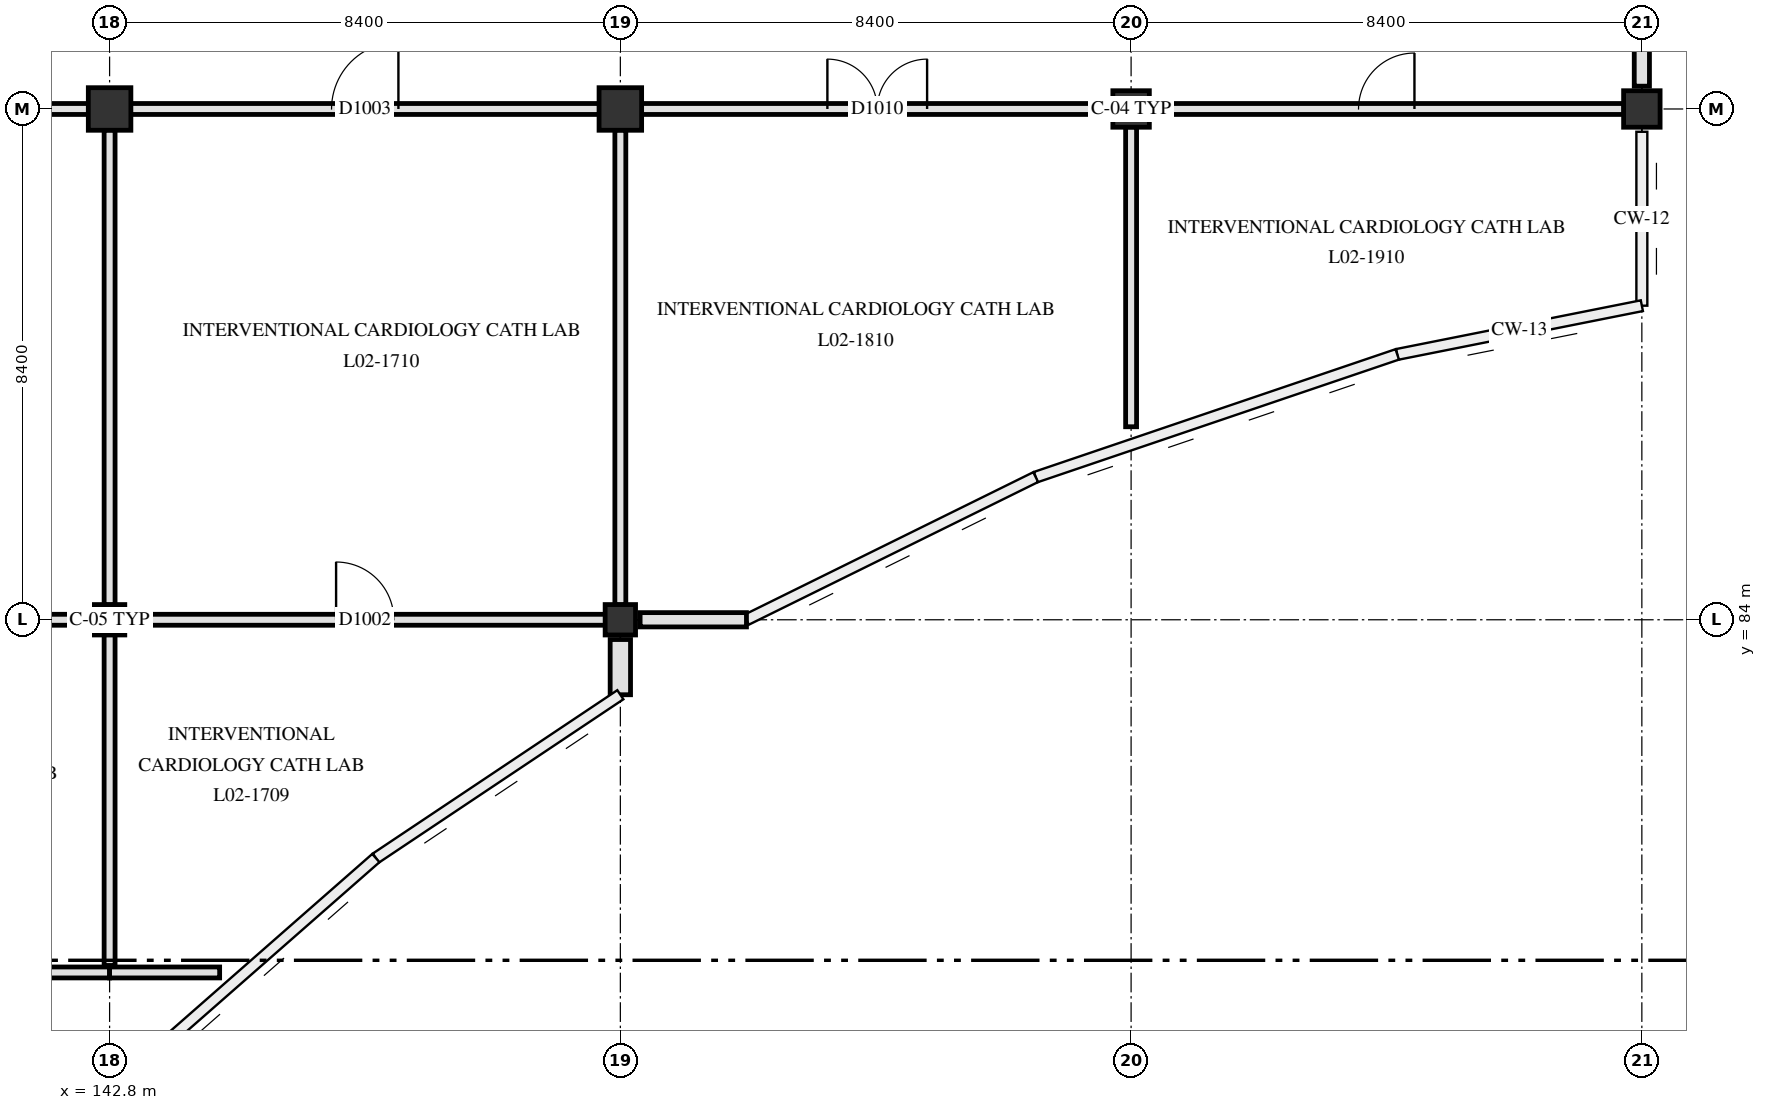
"""IFC4 building model, lengths in metres.
Left out: names, types, materials, properties, quantities, classifications, styles, units other than length and angle.
Written with IfcOpenShell. Run it as: python <this file> out.ifc"""

import sys

from ifc_helpers import new_model, si_unit, direction, frame, frame_2d, origin, origin_2d, place, context, subcontext, project, spatial, rectangle, extrude, element, fill, save


model = new_model("IFC4")
c1 = context("Model", 3, precision=1e-05, world=origin(), true_north=direction((0.0, 1.0)))
c2 = subcontext(c1, "Body", "Model", "MODEL_VIEW")
j1 = project(units=[si_unit("LENGTHUNIT", "METRE"), si_unit("PLANEANGLEUNIT", "RADIAN")], contexts=[c1])
p1 = place(None, origin())
s1 = spatial("IfcSite", under=j1, at=p1, CompositionType="ELEMENT")
p2 = place(p1, origin())
s2 = spatial("IfcBuilding", under=s1, at=p2, CompositionType="ELEMENT")
p3 = place(p2, frame((0.0, 0.0, 9.3)))
s3 = spatial("IfcBuildingStorey", under=s2, at=p3, CompositionType="ELEMENT", Elevation=9.3)
p4 = place(p3, frame((142.8, 84.0, 0.0), z_axis=(0.0, 0.0, 1.0), x_axis=(1.0, 0.0, 0.0)))
e1 = element("IfcColumn", 1, at=p4, inside=s3, PredefinedType="COLUMN", context=c2, shape_type="SweptSolid", body=[
    extrude(rectangle(XDim=0.5, YDim=0.5, at=origin_2d()), origin(), (0.0, 0.0, 1.0), 5.1),
])
p5 = place(p3, frame((142.8, 92.4, 0.0), z_axis=(0.0, 0.0, 1.0), x_axis=(1.0, 0.0, 0.0)))
e2 = element("IfcColumn", 2, at=p5, inside=s3, PredefinedType="COLUMN", context=c2, shape_type="SweptSolid", body=[
    extrude(rectangle(XDim=0.7, YDim=0.7, at=origin_2d()), origin(), (0.0, 0.0, 1.0), 5.1),
])
p6 = place(p3, frame((151.2, 84.0, 0.0), z_axis=(0.0, 0.0, 1.0), x_axis=(1.0, 0.0, 0.0)))
e3 = element("IfcColumn", 3, at=p6, inside=s3, PredefinedType="COLUMN", context=c2, shape_type="SweptSolid", body=[
    extrude(rectangle(XDim=0.5, YDim=0.5, at=origin_2d()), origin(), (0.0, 0.0, 1.0), 5.1),
])
p7 = place(p3, frame((151.2, 92.4, 0.0), z_axis=(0.0, 0.0, 1.0), x_axis=(1.0, 0.0, 0.0)))
e4 = element("IfcColumn", 4, at=p7, inside=s3, PredefinedType="COLUMN", context=c2, shape_type="SweptSolid", body=[
    extrude(rectangle(XDim=0.7, YDim=0.7, at=origin_2d()), origin(), (0.0, 0.0, 1.0), 5.1),
])
for number, where, z_axis, x_axis in (
    (5, (159.6, 92.4, 0.0), (0.0, 0.0, 1.0), (1.0, 0.0, 0.0)),
    (6, (168.0, 92.4, 0.0), (0.0, 0.0, 1.0), (1.0, 0.0, 0.0)),
):
    element("IfcColumn", number, at=place(p3, frame(where, z_axis=z_axis, x_axis=x_axis)), inside=s3, PredefinedType="COLUMN", context=c2, shape_type="SweptSolid", body=[
        extrude(rectangle(XDim=0.6, YDim=0.6, at=origin_2d()), origin(), (0.0, 0.0, 1.0), 5.1),
    ])
p8 = place(p3, frame((168.0, 100.425, 0.0), z_axis=(0.0, 0.0, 1.0), x_axis=(0.0, -1.0, 0.0)))
e7 = element("IfcWall", 7, at=p8, inside=s3, PredefinedType="SOLIDWALL", context=c2, shape_type="SweptSolid", body=[
    extrude(rectangle(XDim=7.65, YDim=0.25, at=frame_2d((3.825, 0.0))), origin(), (0.0, 0.0, 1.0), 4.07),
])
p9 = place(p8, frame((1.062, 0.0, 0.85)))
e8 = element("IfcOpeningElement", 8, at=p9, cuts=e7, PredefinedType="OPENING", context=c2, shape_type="SweptSolid", body=[
    extrude(rectangle(XDim=1.7, YDim=1.42, at=frame_2d((0.85, 0.71))), frame((0.0, 0.135, 0.0), z_axis=(0.0, -1.0, 0.0), x_axis=(1.0, 0.0, 0.0)), (0.0, 0.0, 1.0), 0.27),
])
p10 = place(p8, frame((4.837, 0.0, 0.85)))
e9 = element("IfcOpeningElement", 9, at=p10, cuts=e7, PredefinedType="OPENING", context=c2, shape_type="SweptSolid", body=[
    extrude(rectangle(XDim=1.8, YDim=1.42, at=frame_2d((0.9, 0.71))), frame((0.0, 0.135, 0.0), z_axis=(0.0, -1.0, 0.0), x_axis=(1.0, 0.0, 0.0)), (0.0, 0.0, 1.0), 0.27),
])
p11 = place(p3, frame((153.274, 84.0, 0.0), z_axis=(0.0, 0.0, 1.0), x_axis=(-1.0, 0.0, 0.0)))
e10 = element("IfcWall", 10, at=p11, inside=s3, PredefinedType="SOLIDWALL", context=c2, shape_type="SweptSolid", body=[
    extrude(rectangle(XDim=1.749, YDim=0.235, at=frame_2d((0.875, 0.0))), origin(), (0.0, 0.0, 1.0), 4.77),
])
p12 = place(p3, frame((151.2, 83.675, 0.0), z_axis=(0.0, 0.0, 1.0), x_axis=(0.0, -1.0, 0.0)))
e11 = element("IfcWall", 11, at=p12, inside=s3, PredefinedType="SOLIDWALL", context=c2, shape_type="SweptSolid", body=[
    extrude(rectangle(XDim=0.908, YDim=0.335, at=frame_2d((0.454, 0.0))), origin(), (0.0, 0.0, 1.0), 4.77),
])
p13 = place(p3, frame((137.0, 78.2, 0.0), z_axis=(0.0, 0.0, 1.0), x_axis=(1.0, 0.0, 0.0)))
e12 = element("IfcWall", 12, at=p13, inside=s3, PredefinedType="PARTITIONING", context=c2, shape_type="SweptSolid", body=[
    extrude(rectangle(XDim=5.8, YDim=0.18, at=frame_2d((2.9, 0.0))), origin(), (0.0, 0.0, 1.0), 4.77),
])
p14 = place(p13, frame((2.1, 0.0, 0.0)))
e13 = element("IfcOpeningElement", 13, at=p14, cuts=e12, PredefinedType="OPENING", context=c2, shape_type="SweptSolid", body=[
    extrude(rectangle(XDim=1.6, YDim=2.25, at=frame_2d((0.8, 1.125))), frame((0.0, 0.1, 0.0), z_axis=(0.0, -1.0, 0.0), x_axis=(1.0, 0.0, 0.0)), (0.0, 0.0, 1.0), 0.2),
])
p15 = place(p3, frame((142.8, 78.2, 0.0), z_axis=(0.0, 0.0, 1.0), x_axis=(1.0, 0.0, 0.0)))
e14 = element("IfcWall", 14, at=p15, inside=s3, PredefinedType="PARTITIONING", context=c2, shape_type="SweptSolid", body=[
    extrude(rectangle(XDim=1.81, YDim=0.18, at=frame_2d((0.905, 0.0))), origin(), (0.0, 0.0, 1.0), 4.77),
])
p16 = place(p3, frame((137.0, 84.0, 0.0), z_axis=(0.0, 0.0, 1.0), x_axis=(1.0, 0.0, 0.0)))
e15 = element("IfcWall", 15, at=p16, inside=s3, PredefinedType="PARTITIONING", context=c2, shape_type="SweptSolid", body=[
    extrude(rectangle(XDim=5.555, YDim=0.18, at=frame_2d((2.777, 0.0))), origin(), (0.0, 0.0, 1.0), 4.17),
])
p17 = place(p3, frame((143.045, 84.0, 0.0), z_axis=(0.0, 0.0, 1.0), x_axis=(1.0, 0.0, 0.0)))
e16 = element("IfcWall", 16, at=p17, inside=s3, PredefinedType="PARTITIONING", context=c2, shape_type="SweptSolid", body=[
    extrude(rectangle(XDim=7.91, YDim=0.18, at=frame_2d((3.955, 0.0))), origin(), (0.0, 0.0, 1.0), 4.17),
])
p18 = place(p17, frame((3.48, 0.0, 0.0)))
e17 = element("IfcOpeningElement", 17, at=p18, cuts=e16, PredefinedType="OPENING", context=c2, shape_type="SweptSolid", body=[
    extrude(rectangle(XDim=0.95, YDim=2.1, at=frame_2d((0.475, 1.05))), frame((0.0, 0.1, 0.0), z_axis=(0.0, -1.0, 0.0), x_axis=(1.0, 0.0, 0.0)), (0.0, 0.0, 1.0), 0.2),
])
p19 = place(p3, frame((137.0, 92.4, 0.0), z_axis=(0.0, 0.0, 1.0), x_axis=(1.0, 0.0, 0.0)))
e18 = element("IfcWall", 18, at=p19, inside=s3, PredefinedType="PARTITIONING", context=c2, shape_type="SweptSolid", body=[
    extrude(rectangle(XDim=5.455, YDim=0.18, at=frame_2d((2.728, 0.0))), origin(), (0.0, 0.0, 1.0), 4.17),
])
p20 = place(p19, frame((1.827, 0.0, 0.0)))
e19 = element("IfcOpeningElement", 19, at=p20, cuts=e18, PredefinedType="OPENING", context=c2, shape_type="SweptSolid", body=[
    extrude(rectangle(XDim=1.8, YDim=2.25, at=frame_2d((0.9, 1.125))), frame((0.0, 0.1, 0.0), z_axis=(0.0, -1.0, 0.0), x_axis=(1.0, 0.0, 0.0)), (0.0, 0.0, 1.0), 0.2),
])
p21 = place(p3, frame((143.145, 92.4, 0.0), z_axis=(0.0, 0.0, 1.0), x_axis=(1.0, 0.0, 0.0)))
e20 = element("IfcWall", 20, at=p21, inside=s3, PredefinedType="PARTITIONING", context=c2, shape_type="SweptSolid", body=[
    extrude(rectangle(XDim=7.71, YDim=0.18, at=frame_2d((3.855, 0.0))), origin(), (0.0, 0.0, 1.0), 4.17),
])
p22 = place(p21, frame((3.305, 0.0, 0.0)))
e21 = element("IfcOpeningElement", 21, at=p22, cuts=e20, PredefinedType="OPENING", context=c2, shape_type="SweptSolid", body=[
    extrude(rectangle(XDim=1.1, YDim=2.15, at=frame_2d((0.55, 1.075))), frame((0.0, 0.1, 0.0), z_axis=(0.0, -1.0, 0.0), x_axis=(1.0, 0.0, 0.0)), (0.0, 0.0, 1.0), 0.2),
])
p23 = place(p3, frame((151.545, 92.4, 0.0), z_axis=(0.0, 0.0, 1.0), x_axis=(1.0, 0.0, 0.0)))
e22 = element("IfcWall", 22, at=p23, inside=s3, PredefinedType="PARTITIONING", context=c2, shape_type="SweptSolid", body=[
    extrude(rectangle(XDim=7.76, YDim=0.18, at=frame_2d((3.88, 0.0))), origin(), (0.0, 0.0, 1.0), 4.17),
])
p24 = place(p23, frame((3.06, 0.0, 0.0)))
e23 = element("IfcOpeningElement", 23, at=p24, cuts=e22, PredefinedType="OPENING", context=c2, shape_type="SweptSolid", body=[
    extrude(rectangle(XDim=1.64, YDim=2.28, at=frame_2d((0.82, 1.14))), frame((0.0, 0.1, 0.0), z_axis=(0.0, -1.0, 0.0), x_axis=(1.0, 0.0, 0.0)), (0.0, 0.0, 1.0), 0.2),
])
p25 = place(p3, frame((159.895, 92.4, 0.0), z_axis=(0.0, 0.0, 1.0), x_axis=(1.0, 0.0, 0.0)))
e24 = element("IfcWall", 24, at=p25, inside=s3, PredefinedType="PARTITIONING", context=c2, shape_type="SweptSolid", body=[
    extrude(rectangle(XDim=7.81, YDim=0.18, at=frame_2d((3.905, 0.0))), origin(), (0.0, 0.0, 1.0), 4.17),
])
p26 = place(p25, frame((3.445, 0.0, 0.0)))
e25 = element("IfcOpeningElement", 25, at=p26, cuts=e24, PredefinedType="OPENING", context=c2, shape_type="SweptSolid", body=[
    extrude(rectangle(XDim=0.92, YDim=2.08, at=frame_2d((0.46, 1.04))), frame((0.0, 0.1, 0.0), z_axis=(0.0, -1.0, 0.0), x_axis=(1.0, 0.0, 0.0)), (0.0, 0.0, 1.0), 0.2),
])
p27 = place(p3, frame((142.8, 78.315, 0.0), z_axis=(0.0, 0.0, 1.0), x_axis=(0.0, 1.0, 0.0)))
e26 = element("IfcWall", 26, at=p27, inside=s3, PredefinedType="PARTITIONING", context=c2, shape_type="SweptSolid", body=[
    extrude(rectangle(XDim=5.44, YDim=0.18, at=frame_2d((2.72, 0.0))), origin(), (0.0, 0.0, 1.0), 4.77),
])
for number, where, z_axis, x_axis in (
    (27, (142.8, 84.245, 0.0), (0.0, 0.0, 1.0), (0.0, 1.0, 0.0)),
    (28, (151.2, 84.245, 0.0), (0.0, 0.0, 1.0), (0.0, 1.0, 0.0)),
):
    element("IfcWall", number, at=place(p3, frame(where, z_axis=z_axis, x_axis=x_axis)), inside=s3, PredefinedType="PARTITIONING", context=c2, shape_type="SweptSolid", body=[
        extrude(rectangle(XDim=7.81, YDim=0.18, at=frame_2d((3.905, 0.0))), origin(), (0.0, 0.0, 1.0), 4.17),
    ])
p28 = place(p3, frame((159.6, 87.174, 0.0), z_axis=(0.0, 0.0, 1.0), x_axis=(0.0, 1.0, 0.0)))
e29 = element("IfcWall", 29, at=p28, inside=s3, PredefinedType="PARTITIONING", context=c2, shape_type="SweptSolid", body=[
    extrude(rectangle(XDim=4.931, YDim=0.18, at=frame_2d((2.465, 0.0))), origin(), (0.0, 0.0, 1.0), 4.77),
])
p29 = place(p18, origin())
e30 = element("IfcDoor", 30, at=p29, inside=s3, OperationType="SINGLE_SWING_LEFT", PredefinedType="DOOR", context=c2, shape_type="SweptSolid", body=[
    extrude(rectangle(XDim=0.95, YDim=2.1, at=frame_2d((0.475, 1.05))), frame((0.0, 0.025, 0.0), z_axis=(0.0, -1.0, 0.0), x_axis=(1.0, 0.0, 0.0)), (0.0, 0.0, 1.0), 0.05),
])
fill(e17, e30)
p30 = place(p22, origin())
e31 = element("IfcDoor", 31, at=p30, inside=s3, OperationType="SINGLE_SWING_RIGHT", PredefinedType="DOOR", context=c2, shape_type="SweptSolid", body=[
    extrude(rectangle(XDim=1.1, YDim=2.15, at=frame_2d((0.55, 1.075))), frame((0.0, 0.025, 0.0), z_axis=(0.0, -1.0, 0.0), x_axis=(1.0, 0.0, 0.0)), (0.0, 0.0, 1.0), 0.05),
])
fill(e21, e31)
p31 = place(p24, origin())
e32 = element("IfcDoor", 32, at=p31, inside=s3, OperationType="DOUBLE_SWING_LEFT", PredefinedType="DOOR", context=c2, shape_type="SweptSolid", body=[
    extrude(rectangle(XDim=1.64, YDim=2.28, at=frame_2d((0.82, 1.14))), frame((0.0, 0.025, 0.0), z_axis=(0.0, -1.0, 0.0), x_axis=(1.0, 0.0, 0.0)), (0.0, 0.0, 1.0), 0.05),
])
fill(e23, e32)
p32 = place(p26, origin())
e33 = element("IfcDoor", 33, at=p32, inside=s3, OperationType="SINGLE_SWING_RIGHT", PredefinedType="DOOR", context=c2, shape_type="SweptSolid", body=[
    extrude(rectangle(XDim=0.92, YDim=2.08, at=frame_2d((0.46, 1.04))), frame((0.0, 0.025, 0.0), z_axis=(0.0, -1.0, 0.0), x_axis=(1.0, 0.0, 0.0)), (0.0, 0.0, 1.0), 0.05),
])
fill(e25, e33)
save(model, sys.argv[1])
